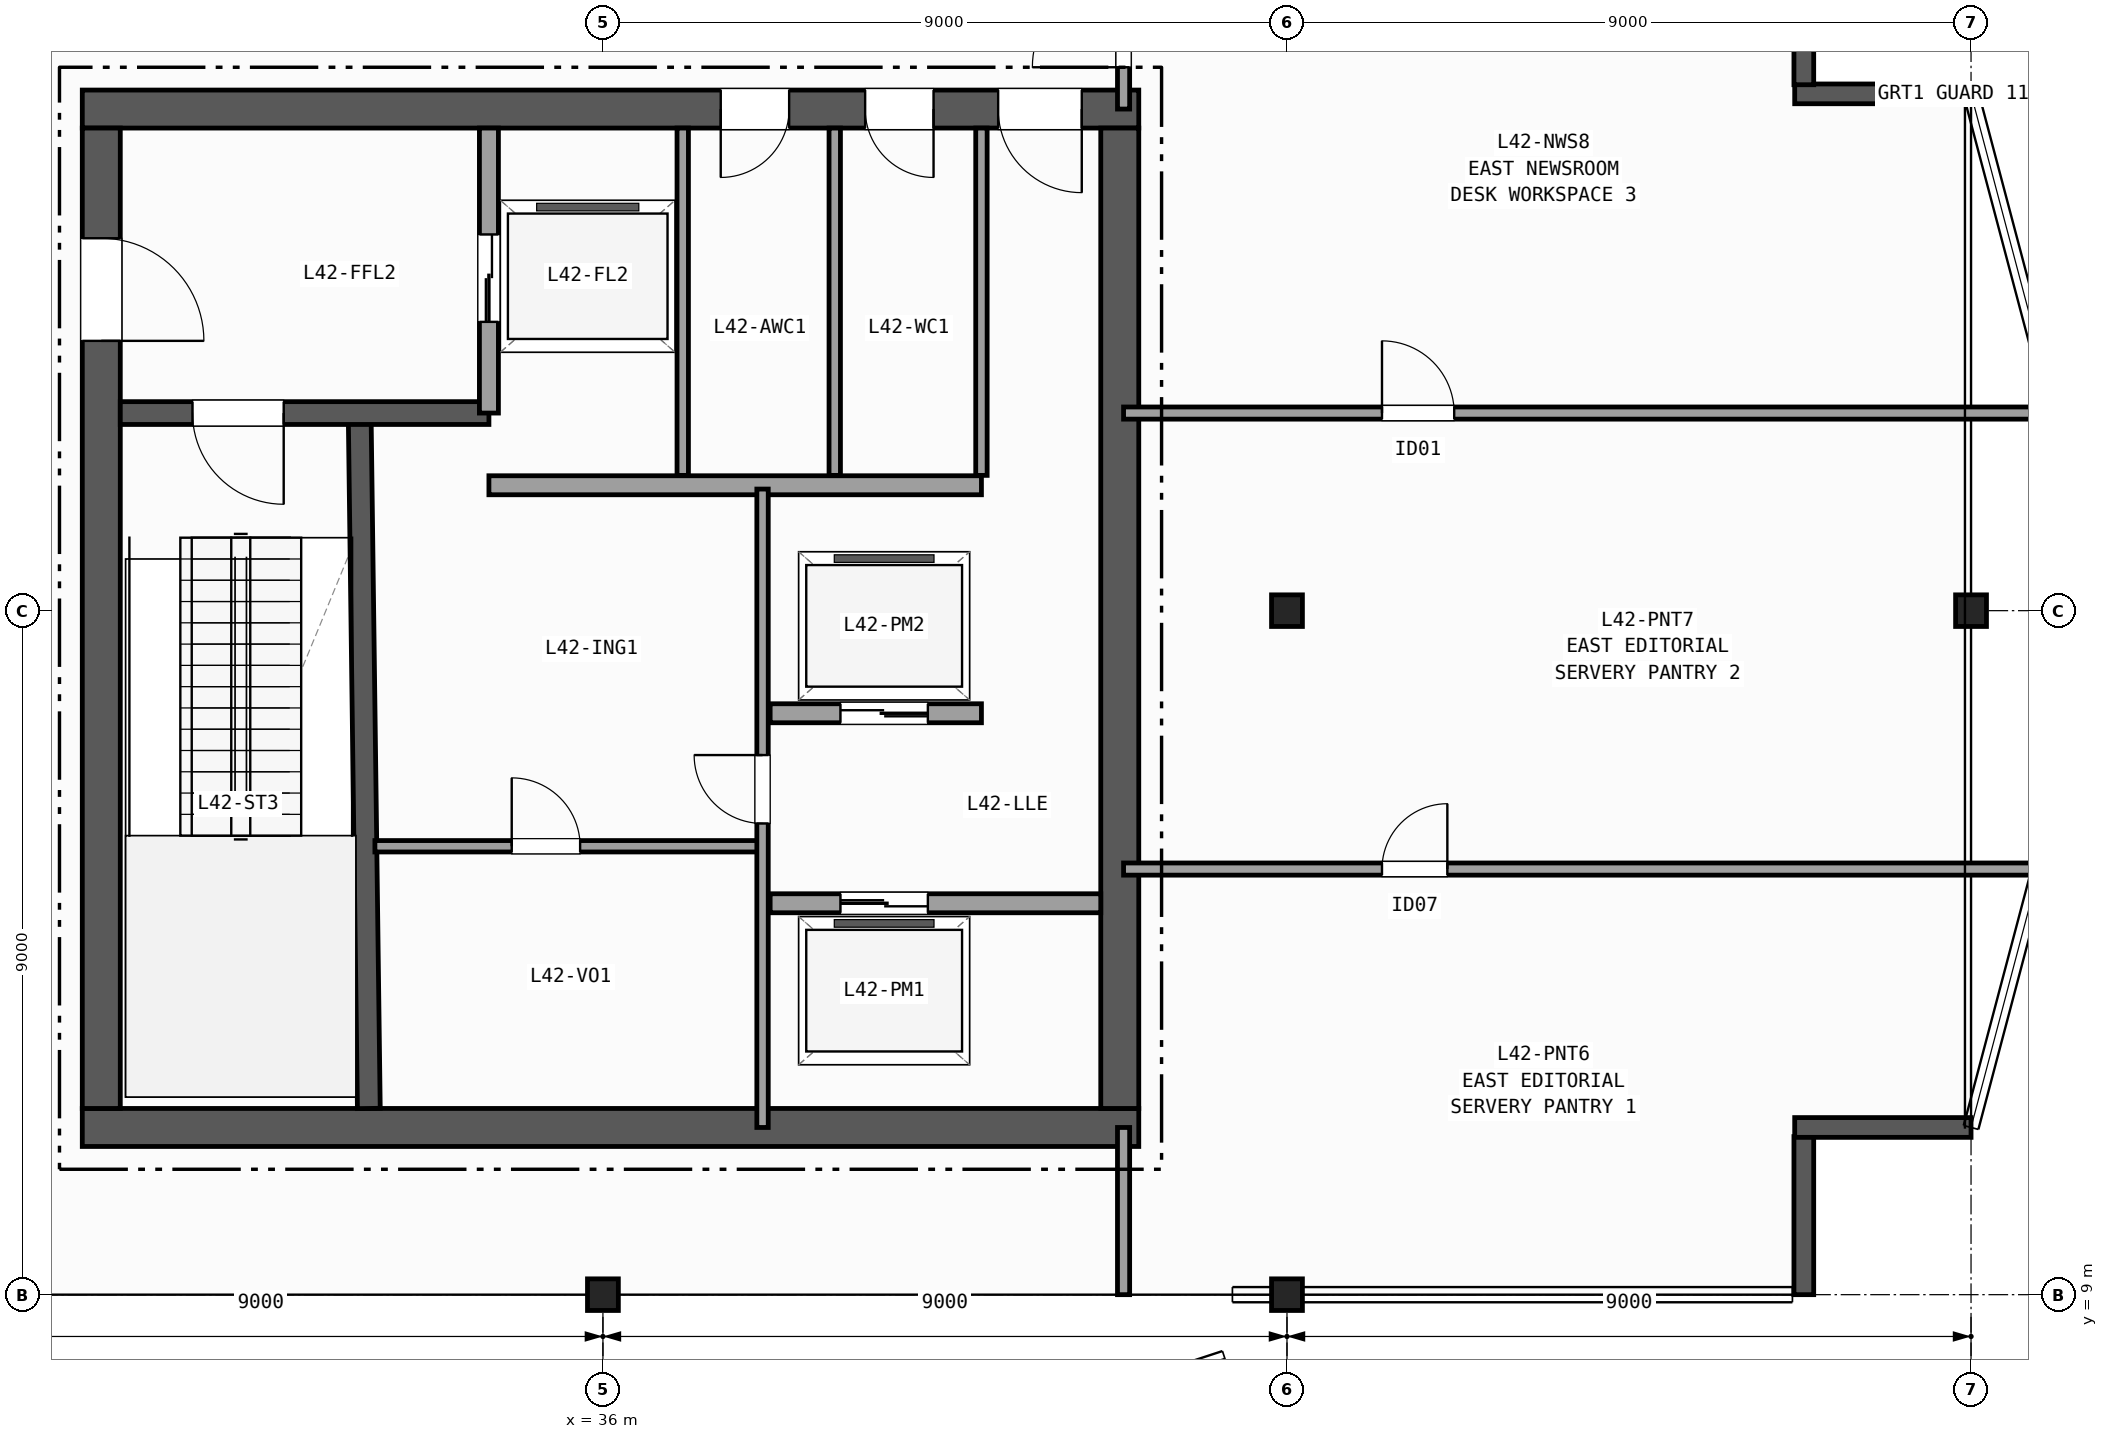
"""IFC4 building model, lengths in metres.
Left out: names, types, materials, properties, quantities, classifications, styles, units other than length and angle.
Written with IfcOpenShell. Run it as: python <this file> out.ifc"""

import sys

from ifc_helpers import new_model, si_unit, direction, frame, frame_2d, origin, origin_2d, place, context, subcontext, project, spatial, rectangle, i_section, extrude, element, fill, save


model = new_model("IFC4")
c1 = context("Model", 3, precision=1e-05, world=origin(), true_north=direction((0.0, 1.0)))
c2 = subcontext(c1, "Body", "Model", "MODEL_VIEW")
j1 = project(units=[si_unit("LENGTHUNIT", "METRE"), si_unit("PLANEANGLEUNIT", "RADIAN")], contexts=[c1])
p1 = place(None, origin())
s1 = spatial("IfcSite", under=j1, at=p1, CompositionType="ELEMENT")
p2 = place(p1, origin())
s2 = spatial("IfcBuilding", under=s1, at=p2, CompositionType="ELEMENT")
p3 = place(p2, frame((0.0, 0.0, 169.2)))
s3 = spatial("IfcBuildingStorey", under=s2, at=p3, CompositionType="ELEMENT", Elevation=169.2)
for number, where, z_axis, x_axis in (
    (1, (36.0, 9.0, 0.0), (0.0, 0.0, 1.0), (1.0, 0.0, 0.0)),
    (2, (45.0, 9.0, 0.0), (0.0, 0.0, 1.0), (1.0, 0.0, 0.0)),
    (3, (45.0, 18.0, 0.0), (0.0, 0.0, 1.0), (1.0, 0.0, 0.0)),
    (4, (54.0, 18.0, 0.0), (0.0, 0.0, 1.0), (1.0, 0.0, 0.0)),
):
    element("IfcColumn", number, at=place(p3, frame(where, z_axis=z_axis, x_axis=x_axis)), inside=s3, PredefinedType="COLUMN", context=c2, shape_type="SweptSolid", body=[
        extrude(i_section(OverallWidth=0.406, OverallDepth=0.416, WebThickness=0.03, FlangeThickness=0.048, FilletRadius=0.015, at=origin_2d()), origin(), (0.0, 0.0, 1.0), 5.0),
    ])
p4 = place(p3, frame((51.8, 9.0, 0.0), z_axis=(0.0, 0.0, 1.0), x_axis=(0.0, 1.0, 0.0)))
e5 = element("IfcWall", 5, at=p4, inside=s3, PredefinedType="SOLIDWALL", context=c2, shape_type="SweptSolid", body=[
    extrude(rectangle(XDim=2.08, YDim=0.26, at=frame_2d((1.04, 0.0))), origin(), (0.0, 0.0, 1.0), 4.72),
])
for number, where, z_axis, x_axis in (
    (6, (51.68, 11.2, 0.0), (0.0, 0.0, 1.0), (1.0, 0.0, 0.0)),
    (7, (54.0, 24.8, 0.0), (0.0, 0.0, 1.0), (-1.0, 0.0, 0.0)),
):
    element("IfcWall", number, at=place(p3, frame(where, z_axis=z_axis, x_axis=x_axis)), inside=s3, PredefinedType="SOLIDWALL", context=c2, shape_type="SweptSolid", body=[
        extrude(rectangle(XDim=2.32, YDim=0.26, at=frame_2d((1.16, 0.0))), origin(), (0.0, 0.0, 1.0), 4.72),
    ])
p5 = place(p3, frame((51.8, 24.92, 0.0), z_axis=(0.0, 0.0, 1.0), x_axis=(0.0, 1.0, 0.0)))
e8 = element("IfcWall", 8, at=p5, inside=s3, PredefinedType="SOLIDWALL", context=c2, shape_type="SweptSolid", body=[
    extrude(rectangle(XDim=2.08, YDim=0.26, at=frame_2d((1.04, 0.0))), origin(), (0.0, 0.0, 1.0), 4.72),
])
p6 = place(p3, frame((29.15, 11.2, 0.0), z_axis=(0.0, 0.0, 1.0), x_axis=(1.0, 0.0, 0.0)))
e9 = element("IfcWall", 9, at=p6, inside=s3, PredefinedType="SHEAR", context=c2, shape_type="SweptSolid", body=[
    extrude(rectangle(XDim=13.9, YDim=0.5, at=frame_2d((6.95, 0.0))), origin(), (0.0, 0.0, 1.0), 4.72),
])
p7 = place(p3, frame((43.05, 24.6, 0.0), z_axis=(0.0, 0.0, 1.0), x_axis=(-1.0, 0.0, 0.0)))
e10 = element("IfcWall", 10, at=p7, inside=s3, PredefinedType="SHEAR", context=c2, shape_type="SweptSolid", body=[
    extrude(rectangle(XDim=13.9, YDim=0.5, at=frame_2d((6.95, 0.0))), origin(), (0.0, 0.0, 1.0), 4.72),
])
p8 = place(p7, frame((0.75, 0.0, 0.0)))
e11 = element("IfcOpeningElement", 11, at=p8, cuts=e10, PredefinedType="OPENING", context=c2, shape_type="SweptSolid", body=[
    extrude(rectangle(XDim=1.1, YDim=2.15, at=frame_2d((0.55, 1.075))), frame((0.0, 0.26, 0.0), z_axis=(0.0, -1.0, 0.0), x_axis=(1.0, 0.0, 0.0)), (0.0, 0.0, 1.0), 0.52),
])
p9 = place(p7, frame((2.7, 0.0, 0.0)))
e12 = element("IfcOpeningElement", 12, at=p9, cuts=e10, PredefinedType="OPENING", context=c2, shape_type="SweptSolid", body=[
    extrude(rectangle(XDim=0.9, YDim=2.1, at=frame_2d((0.45, 1.05))), frame((0.0, 0.26, 0.0), z_axis=(0.0, -1.0, 0.0), x_axis=(1.0, 0.0, 0.0)), (0.0, 0.0, 1.0), 0.52),
])
p10 = place(p7, frame((4.6, 0.0, 0.0)))
e13 = element("IfcOpeningElement", 13, at=p10, cuts=e10, PredefinedType="OPENING", context=c2, shape_type="SweptSolid", body=[
    extrude(rectangle(XDim=0.9, YDim=2.1, at=frame_2d((0.45, 1.05))), frame((0.0, 0.26, 0.0), z_axis=(0.0, -1.0, 0.0), x_axis=(1.0, 0.0, 0.0)), (0.0, 0.0, 1.0), 0.52),
])
p11 = place(p3, frame((29.4, 24.35, 0.0), z_axis=(0.0, 0.0, 1.0), x_axis=(0.0, -1.0, 0.0)))
e14 = element("IfcWall", 14, at=p11, inside=s3, PredefinedType="SHEAR", context=c2, shape_type="SweptSolid", body=[
    extrude(rectangle(XDim=12.9, YDim=0.5, at=frame_2d((6.45, 0.0))), origin(), (0.0, 0.0, 1.0), 4.72),
])
p12 = place(p11, frame((1.45, 0.0, 0.0)))
e15 = element("IfcOpeningElement", 15, at=p12, cuts=e14, PredefinedType="OPENING", context=c2, shape_type="SweptSolid", body=[
    extrude(rectangle(XDim=1.35, YDim=2.15, at=frame_2d((0.675, 1.075))), frame((0.0, 0.26, 0.0), z_axis=(0.0, -1.0, 0.0), x_axis=(1.0, 0.0, 0.0)), (0.0, 0.0, 1.0), 0.52),
])
p13 = place(p3, frame((42.8, 11.45, 0.0), z_axis=(0.0, 0.0, 1.0), x_axis=(0.0, 1.0, 0.0)))
e16 = element("IfcWall", 16, at=p13, inside=s3, PredefinedType="SHEAR", context=c2, shape_type="SweptSolid", body=[
    extrude(rectangle(XDim=12.9, YDim=0.5, at=frame_2d((6.45, 0.0))), origin(), (0.0, 0.0, 1.0), 4.72),
])
p14 = place(p3, frame((32.92, 11.45, 0.0), z_axis=(0.0, 0.0, 1.0), x_axis=(-0.013171578211, 0.999913251001, 0.0)))
e17 = element("IfcWall", 17, at=p14, inside=s3, PredefinedType="SHEAR", context=c2, shape_type="SweptSolid", body=[
    extrude(rectangle(XDim=9.101, YDim=0.3, at=frame_2d((4.55, 0.0))), origin(), (0.0, 0.0, 1.0), 4.72),
])
p15 = place(p3, frame((34.5, 20.6, 0.0), z_axis=(0.0, 0.0, 1.0), x_axis=(-1.0, 0.0, 0.0)))
e18 = element("IfcWall", 18, at=p15, inside=s3, PredefinedType="SHEAR", context=c2, shape_type="SweptSolid", body=[
    extrude(rectangle(XDim=4.85, YDim=0.3, at=frame_2d((2.425, 0.0))), origin(), (0.0, 0.0, 1.0), 4.72),
])
p16 = place(p15, frame((2.7, 0.0, 0.0)))
e19 = element("IfcOpeningElement", 19, at=p16, cuts=e18, PredefinedType="OPENING", context=c2, shape_type="SweptSolid", body=[
    extrude(rectangle(XDim=1.2, YDim=2.15, at=frame_2d((0.6, 1.075))), frame((0.0, 0.16, 0.0), z_axis=(0.0, -1.0, 0.0), x_axis=(1.0, 0.0, 0.0)), (0.0, 0.0, 1.0), 0.32),
])
p17 = place(p3, frame((34.5, 20.6, 0.0), z_axis=(0.0, 0.0, 1.0), x_axis=(0.0, 1.0, 0.0)))
e20 = element("IfcWall", 20, at=p17, inside=s3, PredefinedType="PARTITIONING", context=c2, shape_type="SweptSolid", body=[
    extrude(rectangle(XDim=3.75, YDim=0.25, at=frame_2d((1.875, 0.0))), origin(), (0.0, 0.0, 1.0), 4.72),
])
p18 = place(p17, frame((1.2, 0.0, 0.0)))
e21 = element("IfcOpeningElement", 21, at=p18, cuts=e20, PredefinedType="OPENING", context=c2, shape_type="SweptSolid", body=[
    extrude(rectangle(XDim=1.15, YDim=2.15, at=frame_2d((0.575, 1.075))), frame((0.0, 0.135, 0.0), z_axis=(0.0, -1.0, 0.0), x_axis=(1.0, 0.0, 0.0)), (0.0, 0.0, 1.0), 0.27),
])
p19 = place(p3, frame((34.5, 19.65, 0.0), z_axis=(0.0, 0.0, 1.0), x_axis=(1.0, 0.0, 0.0)))
e22 = element("IfcWall", 22, at=p19, inside=s3, PredefinedType="PARTITIONING", context=c2, shape_type="SweptSolid", body=[
    extrude(rectangle(XDim=6.48, YDim=0.25, at=frame_2d((3.24, 0.0))), origin(), (0.0, 0.0, 1.0), 4.72),
])
p20 = place(p3, frame((38.2, 14.15, 0.0), z_axis=(0.0, 0.0, 1.0), x_axis=(1.0, 0.0, 0.0)))
e23 = element("IfcWall", 23, at=p20, inside=s3, PredefinedType="PARTITIONING", context=c2, shape_type="SweptSolid", body=[
    extrude(rectangle(XDim=4.35, YDim=0.25, at=frame_2d((2.175, 0.0))), origin(), (0.0, 0.0, 1.0), 4.72),
])
p21 = place(p20, frame((0.925, 0.0, 0.0)))
e24 = element("IfcOpeningElement", 24, at=p21, cuts=e23, PredefinedType="OPENING", context=c2, shape_type="SweptSolid", body=[
    extrude(rectangle(XDim=1.15, YDim=2.15, at=frame_2d((0.575, 1.075))), frame((0.0, 0.135, 0.0), z_axis=(0.0, -1.0, 0.0), x_axis=(1.0, 0.0, 0.0)), (0.0, 0.0, 1.0), 0.27),
])
p22 = place(p3, frame((40.98, 16.65, 0.0), z_axis=(0.0, 0.0, 1.0), x_axis=(-1.0, 0.0, 0.0)))
e25 = element("IfcWall", 25, at=p22, inside=s3, PredefinedType="PARTITIONING", context=c2, shape_type="SweptSolid", body=[
    extrude(rectangle(XDim=2.78, YDim=0.25, at=frame_2d((1.39, 0.0))), origin(), (0.0, 0.0, 1.0), 4.72),
])
p23 = place(p22, frame((0.705, 0.0, 0.0)))
e26 = element("IfcOpeningElement", 26, at=p23, cuts=e25, PredefinedType="OPENING", context=c2, shape_type="SweptSolid", body=[
    extrude(rectangle(XDim=1.15, YDim=2.15, at=frame_2d((0.575, 1.075))), frame((0.0, 0.135, 0.0), z_axis=(0.0, -1.0, 0.0), x_axis=(1.0, 0.0, 0.0)), (0.0, 0.0, 1.0), 0.27),
])
p24 = place(p3, frame((33.0, 14.9, 0.0), z_axis=(0.0, 0.0, 1.0), x_axis=(1.0, 0.0, 0.0)))
e27 = element("IfcWall", 27, at=p24, inside=s3, PredefinedType="PARTITIONING", context=c2, shape_type="SweptSolid", body=[
    extrude(rectangle(XDim=5.1, YDim=0.15, at=frame_2d((2.55, 0.0))), origin(), (0.0, 0.0, 1.0), 4.72),
])
p25 = place(p24, frame((1.8, 0.0, 0.0)))
e28 = element("IfcOpeningElement", 28, at=p25, cuts=e27, PredefinedType="OPENING", context=c2, shape_type="SweptSolid", body=[
    extrude(rectangle(XDim=0.9, YDim=2.1, at=frame_2d((0.45, 1.05))), frame((0.0, 0.085, 0.0), z_axis=(0.0, -1.0, 0.0), x_axis=(1.0, 0.0, 0.0)), (0.0, 0.0, 1.0), 0.17),
])
p26 = place(p3, frame((38.1, 11.2, 0.0), z_axis=(0.0, 0.0, 1.0), x_axis=(0.0, 1.0, 0.0)))
e29 = element("IfcWall", 29, at=p26, inside=s3, PredefinedType="PARTITIONING", context=c2, shape_type="SweptSolid", body=[
    extrude(rectangle(XDim=8.4, YDim=0.15, at=frame_2d((4.2, 0.0))), origin(), (0.0, 0.0, 1.0), 4.72),
])
p27 = place(p26, frame((4.0, 0.0, 0.0)))
e30 = element("IfcOpeningElement", 30, at=p27, cuts=e29, PredefinedType="OPENING", context=c2, shape_type="SweptSolid", body=[
    extrude(rectangle(XDim=0.9, YDim=2.1, at=frame_2d((0.45, 1.05))), frame((0.0, 0.085, 0.0), z_axis=(0.0, -1.0, 0.0), x_axis=(1.0, 0.0, 0.0)), (0.0, 0.0, 1.0), 0.17),
])
for number, where, z_axis, x_axis in (
    (31, (37.05, 19.78, 0.0), (0.0, 0.0, 1.0), (0.0, 1.0, 0.0)),
    (32, (39.05, 19.78, 0.0), (0.0, 0.0, 1.0), (0.0, 1.0, 0.0)),
    (33, (40.98, 19.78, 0.0), (0.0, 0.0, 1.0), (0.0, 1.0, 0.0)),
):
    element("IfcWall", number, at=place(p3, frame(where, z_axis=z_axis, x_axis=x_axis)), inside=s3, PredefinedType="PARTITIONING", context=c2, shape_type="SweptSolid", body=[
        extrude(rectangle(XDim=4.57, YDim=0.15, at=frame_2d((2.285, 0.0))), origin(), (0.0, 0.0, 1.0), 4.72),
    ])
p28 = place(p3, frame((42.85, 9.0, 0.0), z_axis=(0.0, 0.0, 1.0), x_axis=(0.0, 1.0, 0.0)))
e34 = element("IfcWall", 34, at=p28, inside=s3, PredefinedType="PARTITIONING", context=c2, shape_type="SweptSolid", body=[
    extrude(rectangle(XDim=2.2, YDim=0.16, at=frame_2d((1.1, 0.0))), origin(), (0.0, 0.0, 1.0), 3.934),
])
p29 = place(p3, frame((42.85, 24.6, 0.0), z_axis=(0.0, 0.0, 1.0), x_axis=(0.0, 1.0, 0.0)))
e35 = element("IfcWall", 35, at=p29, inside=s3, PredefinedType="PARTITIONING", context=c2, shape_type="SweptSolid", body=[
    extrude(rectangle(XDim=2.4, YDim=0.16, at=frame_2d((1.2, 0.0))), origin(), (0.0, 0.0, 1.0), 3.934),
])
p30 = place(p29, frame((0.55, 0.0, 0.0)))
e36 = element("IfcOpeningElement", 36, at=p30, cuts=e35, PredefinedType="OPENING", context=c2, shape_type="SweptSolid", body=[
    extrude(rectangle(XDim=1.2, YDim=2.15, at=frame_2d((0.6, 1.075))), frame((0.0, 0.09, 0.0), z_axis=(0.0, -1.0, 0.0), x_axis=(1.0, 0.0, 0.0)), (0.0, 0.0, 1.0), 0.18),
])
p31 = place(p3, frame((42.85, 14.6, 0.0), z_axis=(0.0, 0.0, 1.0), x_axis=(1.0, 0.0, 0.0)))
e37 = element("IfcWall", 37, at=p31, inside=s3, PredefinedType="PARTITIONING", context=c2, shape_type="SweptSolid", body=[
    extrude(rectangle(XDim=12.05, YDim=0.16, at=frame_2d((6.025, 0.0))), origin(), (0.0, 0.0, 1.0), 4.092),
])
p32 = place(p31, frame((3.4, 0.0, 0.0)))
e38 = element("IfcOpeningElement", 38, at=p32, cuts=e37, PredefinedType="OPENING", context=c2, shape_type="SweptSolid", body=[
    extrude(rectangle(XDim=0.86, YDim=2.05, at=frame_2d((0.43, 1.025))), frame((0.0, 0.09, 0.0), z_axis=(0.0, -1.0, 0.0), x_axis=(1.0, 0.0, 0.0)), (0.0, 0.0, 1.0), 0.18),
])
p33 = place(p3, frame((42.85, 20.6, 0.0), z_axis=(0.0, 0.0, 1.0), x_axis=(1.0, 0.0, 0.0)))
e39 = element("IfcWall", 39, at=p33, inside=s3, PredefinedType="PARTITIONING", context=c2, shape_type="SweptSolid", body=[
    extrude(rectangle(XDim=12.262, YDim=0.16, at=frame_2d((6.131, 0.0))), origin(), (0.0, 0.0, 1.0), 4.092),
])
p34 = place(p33, frame((3.4, 0.0, 0.0)))
e40 = element("IfcOpeningElement", 40, at=p34, cuts=e39, PredefinedType="OPENING", context=c2, shape_type="SweptSolid", body=[
    extrude(rectangle(XDim=0.95, YDim=2.1, at=frame_2d((0.475, 1.05))), frame((0.0, 0.09, 0.0), z_axis=(0.0, -1.0, 0.0), x_axis=(1.0, 0.0, 0.0)), (0.0, 0.0, 1.0), 0.18),
])
p35 = place(p16, origin())
e41 = element("IfcDoor", 41, at=p35, inside=s3, OperationType="SINGLE_SWING_LEFT", PredefinedType="DOOR", context=c2, shape_type="SweptSolid", body=[
    extrude(rectangle(XDim=1.2, YDim=2.15, at=frame_2d((0.6, 1.075))), frame((0.0, 0.025, 0.0), z_axis=(0.0, -1.0, 0.0), x_axis=(1.0, 0.0, 0.0)), (0.0, 0.0, 1.0), 0.05),
])
fill(e19, e41)
p36 = place(p12, origin())
e42 = element("IfcDoor", 42, at=p36, inside=s3, OperationType="SINGLE_SWING_RIGHT", PredefinedType="DOOR", context=c2, shape_type="SweptSolid", body=[
    extrude(rectangle(XDim=1.35, YDim=2.15, at=frame_2d((0.675, 1.075))), frame((0.0, 0.025, 0.0), z_axis=(0.0, -1.0, 0.0), x_axis=(1.0, 0.0, 0.0)), (0.0, 0.0, 1.0), 0.05),
])
fill(e15, e42)
p37 = place(p8, origin())
e43 = element("IfcDoor", 43, at=p37, inside=s3, OperationType="SINGLE_SWING_LEFT", PredefinedType="DOOR", context=c2, shape_type="SweptSolid", body=[
    extrude(rectangle(XDim=1.1, YDim=2.15, at=frame_2d((0.55, 1.075))), frame((0.0, 0.025, 0.0), z_axis=(0.0, -1.0, 0.0), x_axis=(1.0, 0.0, 0.0)), (0.0, 0.0, 1.0), 0.05),
])
fill(e11, e43)
p38 = place(p9, origin())
e44 = element("IfcDoor", 44, at=p38, inside=s3, OperationType="SINGLE_SWING_LEFT", PredefinedType="DOOR", context=c2, shape_type="SweptSolid", body=[
    extrude(rectangle(XDim=0.9, YDim=2.1, at=frame_2d((0.45, 1.05))), frame((0.0, 0.025, 0.0), z_axis=(0.0, -1.0, 0.0), x_axis=(1.0, 0.0, 0.0)), (0.0, 0.0, 1.0), 0.05),
])
fill(e12, e44)
p39 = place(p10, origin())
e45 = element("IfcDoor", 45, at=p39, inside=s3, OperationType="SINGLE_SWING_RIGHT", PredefinedType="DOOR", context=c2, shape_type="SweptSolid", body=[
    extrude(rectangle(XDim=0.9, YDim=2.1, at=frame_2d((0.45, 1.05))), frame((0.0, 0.025, 0.0), z_axis=(0.0, -1.0, 0.0), x_axis=(1.0, 0.0, 0.0)), (0.0, 0.0, 1.0), 0.05),
])
fill(e13, e45)
p40 = place(p18, origin())
e46 = element("IfcDoor", 46, at=p40, inside=s3, OperationType="DOUBLE_DOOR_SLIDING", PredefinedType="DOOR", context=c2, shape_type="SweptSolid", body=[
    extrude(rectangle(XDim=1.15, YDim=2.15, at=frame_2d((0.575, 1.075))), frame((0.0, 0.025, 0.0), z_axis=(0.0, -1.0, 0.0), x_axis=(1.0, 0.0, 0.0)), (0.0, 0.0, 1.0), 0.05),
])
fill(e21, e46)
p41 = place(p21, origin())
e47 = element("IfcDoor", 47, at=p41, inside=s3, OperationType="DOUBLE_DOOR_SLIDING", PredefinedType="DOOR", context=c2, shape_type="SweptSolid", body=[
    extrude(rectangle(XDim=1.15, YDim=2.15, at=frame_2d((0.575, 1.075))), frame((0.0, 0.025, 0.0), z_axis=(0.0, -1.0, 0.0), x_axis=(1.0, 0.0, 0.0)), (0.0, 0.0, 1.0), 0.05),
])
fill(e24, e47)
p42 = place(p23, origin())
e48 = element("IfcDoor", 48, at=p42, inside=s3, OperationType="DOUBLE_DOOR_SLIDING", PredefinedType="DOOR", context=c2, shape_type="SweptSolid", body=[
    extrude(rectangle(XDim=1.15, YDim=2.15, at=frame_2d((0.575, 1.075))), frame((0.0, 0.025, 0.0), z_axis=(0.0, -1.0, 0.0), x_axis=(1.0, 0.0, 0.0)), (0.0, 0.0, 1.0), 0.05),
])
fill(e26, e48)
p43 = place(p27, origin())
e49 = element("IfcDoor", 49, at=p43, inside=s3, OperationType="SINGLE_SWING_RIGHT", PredefinedType="DOOR", context=c2, shape_type="SweptSolid", body=[
    extrude(rectangle(XDim=0.9, YDim=2.1, at=frame_2d((0.45, 1.05))), frame((0.0, 0.025, 0.0), z_axis=(0.0, -1.0, 0.0), x_axis=(1.0, 0.0, 0.0)), (0.0, 0.0, 1.0), 0.05),
])
fill(e30, e49)
p44 = place(p25, origin())
e50 = element("IfcDoor", 50, at=p44, inside=s3, OperationType="SINGLE_SWING_LEFT", PredefinedType="DOOR", context=c2, shape_type="SweptSolid", body=[
    extrude(rectangle(XDim=0.9, YDim=2.1, at=frame_2d((0.45, 1.05))), frame((0.0, 0.025, 0.0), z_axis=(0.0, -1.0, 0.0), x_axis=(1.0, 0.0, 0.0)), (0.0, 0.0, 1.0), 0.05),
])
fill(e28, e50)
p45 = place(p30, origin())
e51 = element("IfcDoor", 51, at=p45, inside=s3, OperationType="SINGLE_SWING_LEFT", PredefinedType="DOOR", context=c2, shape_type="SweptSolid", body=[
    extrude(rectangle(XDim=1.2, YDim=2.15, at=frame_2d((0.6, 1.075))), frame((0.0, 0.025, 0.0), z_axis=(0.0, -1.0, 0.0), x_axis=(1.0, 0.0, 0.0)), (0.0, 0.0, 1.0), 0.05),
])
fill(e36, e51)
p46 = place(p32, origin())
e52 = element("IfcDoor", 52, at=p46, inside=s3, OperationType="SINGLE_SWING_RIGHT", PredefinedType="DOOR", context=c2, shape_type="SweptSolid", body=[
    extrude(rectangle(XDim=0.86, YDim=2.05, at=frame_2d((0.43, 1.025))), frame((0.0, 0.025, 0.0), z_axis=(0.0, -1.0, 0.0), x_axis=(1.0, 0.0, 0.0)), (0.0, 0.0, 1.0), 0.05),
])
fill(e38, e52)
p47 = place(p34, origin())
e53 = element("IfcDoor", 53, at=p47, inside=s3, OperationType="SINGLE_SWING_LEFT", PredefinedType="DOOR", context=c2, shape_type="SweptSolid", body=[
    extrude(rectangle(XDim=0.95, YDim=2.1, at=frame_2d((0.475, 1.05))), frame((0.0, 0.025, 0.0), z_axis=(0.0, -1.0, 0.0), x_axis=(1.0, 0.0, 0.0)), (0.0, 0.0, 1.0), 0.05),
])
fill(e40, e53)
save(model, sys.argv[1])
